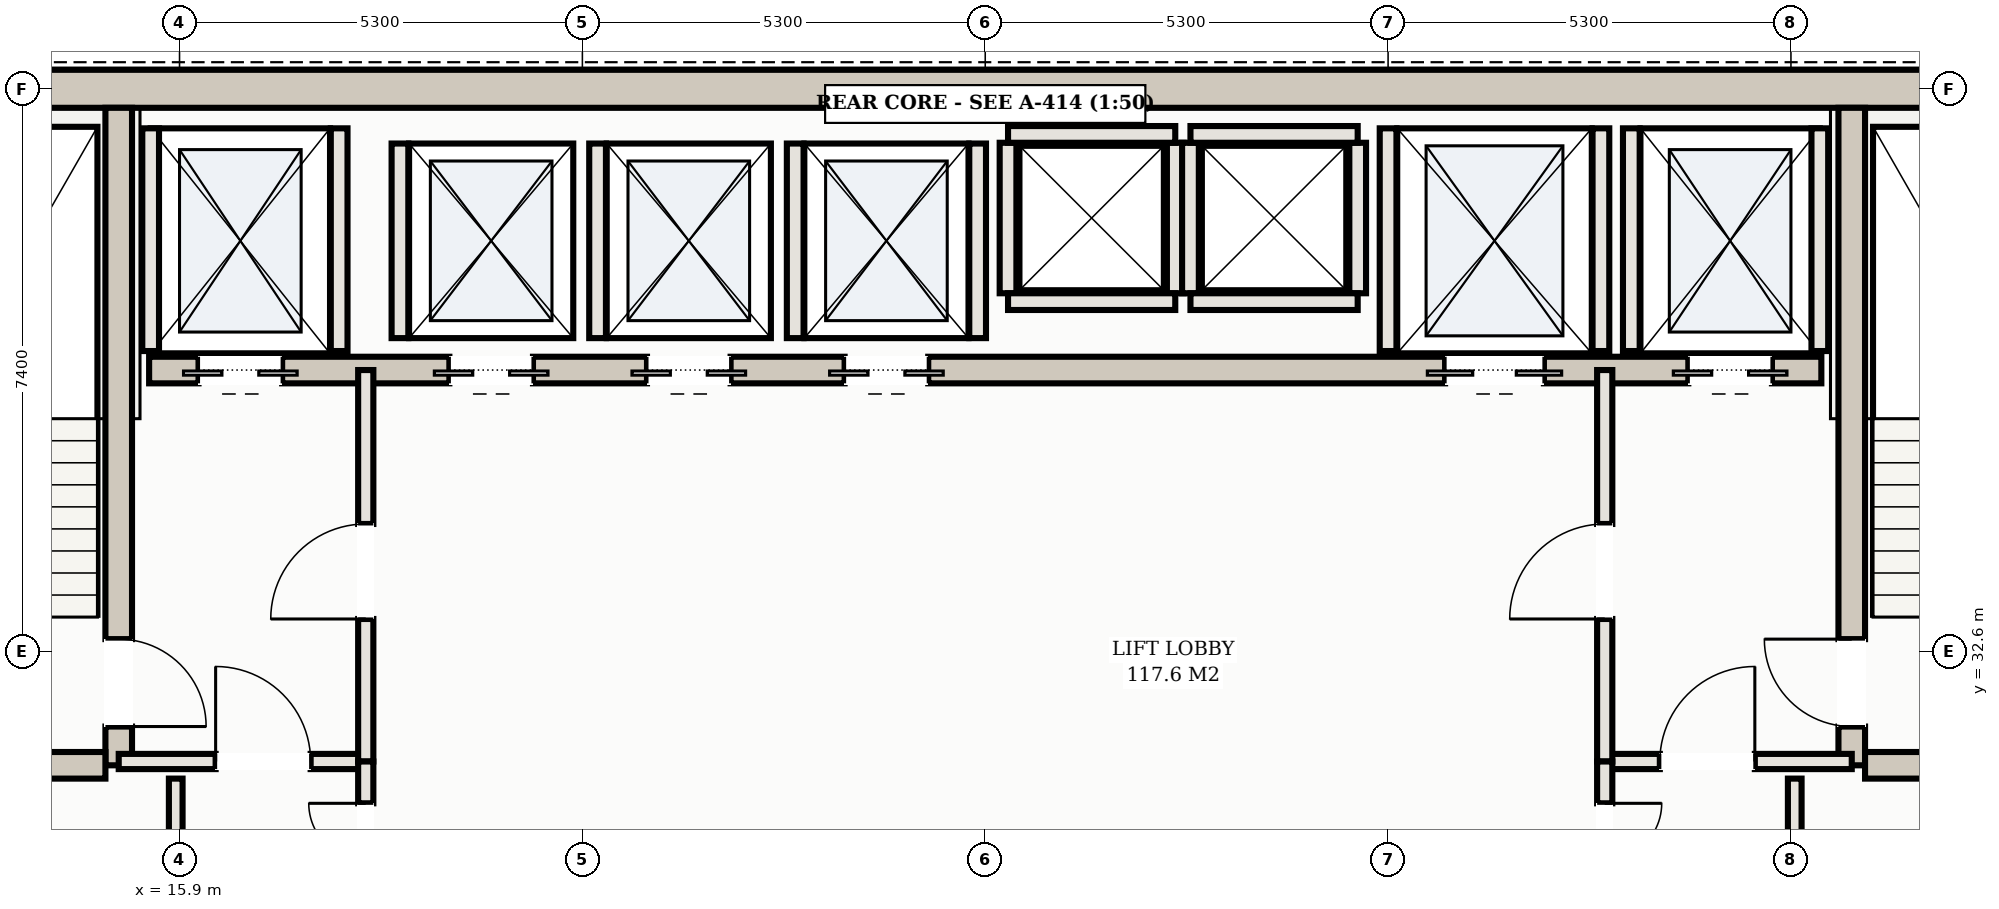
"""IFC4 building model, lengths in metres.
Left out: names, types, materials, properties, quantities, classifications, styles, units other than length and angle.
Written with IfcOpenShell. Run it as: python <this file> out.ifc"""

import sys

from ifc_helpers import new_model, si_unit, direction, frame, frame_2d, origin, place, context, subcontext, project, spatial, rectangle, extrude, element, fill, save


model = new_model("IFC4")
c1 = context("Model", 3, precision=1e-05, world=origin(), true_north=direction((0.0, 1.0)))
c2 = subcontext(c1, "Body", "Model", "MODEL_VIEW")
j1 = project(units=[si_unit("LENGTHUNIT", "METRE"), si_unit("PLANEANGLEUNIT", "RADIAN")], contexts=[c1])
p1 = place(None, origin())
s1 = spatial("IfcSite", under=j1, at=p1, CompositionType="ELEMENT")
p2 = place(p1, origin())
s2 = spatial("IfcBuilding", under=s1, at=p2, CompositionType="ELEMENT")
p3 = place(p2, frame((0.0, 0.0, 239.6)))
s3 = spatial("IfcBuildingStorey", under=s2, at=p3, CompositionType="ELEMENT", Elevation=239.6)
p4 = place(p3, frame((10.35, 40.0, 0.0), z_axis=(0.0, 0.0, 1.0), x_axis=(1.0, 0.0, 0.0)))
e1 = element("IfcWall", 1, at=p4, inside=s3, PredefinedType="SHEAR", context=c2, shape_type="SweptSolid", body=[
    extrude(rectangle(XDim=32.3, YDim=0.5, at=frame_2d((16.15, 0.0))), origin(), (0.0, 0.0, 1.0), 3.11),
])
p5 = place(p3, frame((15.1, 31.1, 0.0), z_axis=(0.0, 0.0, 1.0), x_axis=(0.0, 1.0, 0.0)))
e2 = element("IfcWall", 2, at=p5, inside=s3, PredefinedType="SHEAR", context=c2, shape_type="SweptSolid", body=[
    extrude(rectangle(XDim=8.65, YDim=0.35, at=frame_2d((4.325, 0.0))), origin(), (0.0, 0.0, 1.0), 3.11),
])
p6 = place(p5, frame((0.51, 0.0, 0.0)))
e3 = element("IfcOpeningElement", 3, at=p6, cuts=e2, PredefinedType="OPENING", context=c2, shape_type="SweptSolid", body=[
    extrude(rectangle(XDim=1.15, YDim=2.2, at=frame_2d((0.575, 1.1))), frame((0.0, 0.185, 0.0), z_axis=(0.0, -1.0, 0.0), x_axis=(1.0, 0.0, 0.0)), (0.0, 0.0, 1.0), 0.37),
])
p7 = place(p3, frame((10.85, 31.1, 0.0), z_axis=(0.0, 0.0, 1.0), x_axis=(1.0, 0.0, 0.0)))
e4 = element("IfcWall", 4, at=p7, inside=s3, PredefinedType="SHEAR", context=c2, shape_type="SweptSolid", body=[
    extrude(rectangle(XDim=4.075, YDim=0.35, at=frame_2d((2.038, 0.0))), origin(), (0.0, 0.0, 1.0), 3.11),
])
p8 = place(p3, frame((37.9, 31.1, 0.0), z_axis=(0.0, 0.0, 1.0), x_axis=(0.0, 1.0, 0.0)))
e5 = element("IfcWall", 5, at=p8, inside=s3, PredefinedType="SHEAR", context=c2, shape_type="SweptSolid", body=[
    extrude(rectangle(XDim=8.65, YDim=0.35, at=frame_2d((4.325, 0.0))), origin(), (0.0, 0.0, 1.0), 3.11),
])
p9 = place(p8, frame((0.51, 0.0, 0.0)))
e6 = element("IfcOpeningElement", 6, at=p9, cuts=e5, PredefinedType="OPENING", context=c2, shape_type="SweptSolid", body=[
    extrude(rectangle(XDim=1.15, YDim=2.2, at=frame_2d((0.575, 1.1))), frame((0.0, 0.185, 0.0), z_axis=(0.0, -1.0, 0.0), x_axis=(1.0, 0.0, 0.0)), (0.0, 0.0, 1.0), 0.37),
])
p10 = place(p3, frame((38.075, 31.1, 0.0), z_axis=(0.0, 0.0, 1.0), x_axis=(1.0, 0.0, 0.0)))
e7 = element("IfcWall", 7, at=p10, inside=s3, PredefinedType="SHEAR", context=c2, shape_type="SweptSolid", body=[
    extrude(rectangle(XDim=4.075, YDim=0.35, at=frame_2d((2.038, 0.0))), origin(), (0.0, 0.0, 1.0), 3.11),
])
p11 = place(p3, frame((15.5, 36.3, 0.0), z_axis=(0.0, 0.0, 1.0), x_axis=(1.0, 0.0, 0.0)))
e8 = element("IfcWall", 8, at=p11, inside=s3, PredefinedType="SHEAR", context=c2, shape_type="SweptSolid", body=[
    extrude(rectangle(XDim=22.0, YDim=0.35, at=frame_2d((11.0, 0.0))), origin(), (0.0, 0.0, 1.0), 3.11),
])
p12 = place(p11, frame((0.65, 0.0, 0.0)))
e9 = element("IfcOpeningElement", 9, at=p12, cuts=e8, PredefinedType="OPENING", context=c2, shape_type="SweptSolid", body=[
    extrude(rectangle(XDim=1.1, YDim=2.15, at=frame_2d((0.55, 1.075))), frame((0.0, 0.185, 0.0), z_axis=(0.0, -1.0, 0.0), x_axis=(1.0, 0.0, 0.0)), (0.0, 0.0, 1.0), 0.37),
])
p13 = place(p11, frame((20.25, 0.0, 0.0)))
e10 = element("IfcOpeningElement", 10, at=p13, cuts=e8, PredefinedType="OPENING", context=c2, shape_type="SweptSolid", body=[
    extrude(rectangle(XDim=1.1, YDim=2.15, at=frame_2d((0.55, 1.075))), frame((0.0, 0.185, 0.0), z_axis=(0.0, -1.0, 0.0), x_axis=(1.0, 0.0, 0.0)), (0.0, 0.0, 1.0), 0.37),
])
p14 = place(p11, frame((17.05, 0.0, 0.0)))
e11 = element("IfcOpeningElement", 11, at=p14, cuts=e8, PredefinedType="OPENING", context=c2, shape_type="SweptSolid", body=[
    extrude(rectangle(XDim=1.3, YDim=2.2, at=frame_2d((0.65, 1.1))), frame((0.0, 0.185, 0.0), z_axis=(0.0, -1.0, 0.0), x_axis=(1.0, 0.0, 0.0)), (0.0, 0.0, 1.0), 0.37),
])
p15 = place(p11, frame((3.95, 0.0, 0.0)))
e12 = element("IfcOpeningElement", 12, at=p15, cuts=e8, PredefinedType="OPENING", context=c2, shape_type="SweptSolid", body=[
    extrude(rectangle(XDim=1.1, YDim=2.15, at=frame_2d((0.55, 1.075))), frame((0.0, 0.185, 0.0), z_axis=(0.0, -1.0, 0.0), x_axis=(1.0, 0.0, 0.0)), (0.0, 0.0, 1.0), 0.37),
])
p16 = place(p11, frame((6.55, 0.0, 0.0)))
e13 = element("IfcOpeningElement", 13, at=p16, cuts=e8, PredefinedType="OPENING", context=c2, shape_type="SweptSolid", body=[
    extrude(rectangle(XDim=1.1, YDim=2.15, at=frame_2d((0.55, 1.075))), frame((0.0, 0.185, 0.0), z_axis=(0.0, -1.0, 0.0), x_axis=(1.0, 0.0, 0.0)), (0.0, 0.0, 1.0), 0.37),
])
p17 = place(p11, frame((9.15, 0.0, 0.0)))
e14 = element("IfcOpeningElement", 14, at=p17, cuts=e8, PredefinedType="OPENING", context=c2, shape_type="SweptSolid", body=[
    extrude(rectangle(XDim=1.1, YDim=2.15, at=frame_2d((0.55, 1.075))), frame((0.0, 0.185, 0.0), z_axis=(0.0, -1.0, 0.0), x_axis=(1.0, 0.0, 0.0)), (0.0, 0.0, 1.0), 0.37),
])
for number, where, z_axis, x_axis in (
    (15, (15.52, 36.55, 0.0), (0.0, 0.0, 1.0), (0.0, 1.0, 0.0)),
    (16, (18.0, 36.55, 0.0), (0.0, 0.0, 1.0), (0.0, 1.0, 0.0)),
    (17, (35.0, 36.55, 0.0), (0.0, 0.0, 1.0), (0.0, 1.0, 0.0)),
    (18, (37.48, 36.55, 0.0), (0.0, 0.0, 1.0), (0.0, 1.0, 0.0)),
    (19, (31.8, 36.55, 0.0), (0.0, 0.0, 1.0), (0.0, 1.0, 0.0)),
    (20, (34.6, 36.55, 0.0), (0.0, 0.0, 1.0), (0.0, 1.0, 0.0)),
):
    element("IfcWall", number, at=place(p3, frame(where, z_axis=z_axis, x_axis=x_axis)), inside=s3, PredefinedType="SOLIDWALL", context=c2, shape_type="SweptSolid", body=[
        extrude(rectangle(XDim=2.93, YDim=0.22, at=frame_2d((1.465, 0.0))), origin(), (0.0, 0.0, 1.0), 3.11),
    ])
for number, where, z_axis, x_axis in (
    (21, (18.8, 36.72, 0.0), (0.0, 0.0, 1.0), (0.0, 1.0, 0.0)),
    (22, (21.4, 36.72, 0.0), (0.0, 0.0, 1.0), (0.0, 1.0, 0.0)),
    (23, (24.0, 36.72, 0.0), (0.0, 0.0, 1.0), (0.0, 1.0, 0.0)),
    (24, (26.4, 36.72, 0.0), (0.0, 0.0, 1.0), (0.0, 1.0, 0.0)),
):
    element("IfcWall", number, at=place(p3, frame(where, z_axis=z_axis, x_axis=x_axis)), inside=s3, PredefinedType="SOLIDWALL", context=c2, shape_type="SweptSolid", body=[
        extrude(rectangle(XDim=2.56, YDim=0.22, at=frame_2d((1.28, 0.0))), origin(), (0.0, 0.0, 1.0), 3.11),
    ])
for number, where, z_axis, x_axis in (
    (25, (26.8, 37.31, 0.0), (0.0, 0.0, 1.0), (0.0, 1.0, 0.0)),
    (26, (29.0, 37.31, 0.0), (0.0, 0.0, 1.0), (0.0, 1.0, 0.0)),
):
    element("IfcWall", number, at=place(p3, frame(where, z_axis=z_axis, x_axis=x_axis)), inside=s3, PredefinedType="SOLIDWALL", context=c2, shape_type="SweptSolid", body=[
        extrude(rectangle(XDim=1.98, YDim=0.22, at=frame_2d((0.99, 0.0))), origin(), (0.0, 0.0, 1.0), 3.11),
    ])
for number, where, z_axis, x_axis in (
    (27, (26.8, 39.4, 0.0), (0.0, 0.0, 1.0), (1.0, 0.0, 0.0)),
    (28, (26.8, 37.2, 0.0), (0.0, 0.0, 1.0), (1.0, 0.0, 0.0)),
):
    element("IfcWall", number, at=place(p3, frame(where, z_axis=z_axis, x_axis=x_axis)), inside=s3, PredefinedType="SOLIDWALL", context=c2, shape_type="SweptSolid", body=[
        extrude(rectangle(XDim=2.2, YDim=0.22, at=frame_2d((1.1, 0.0))), origin(), (0.0, 0.0, 1.0), 3.11),
    ])
for number, where, z_axis, x_axis in (
    (29, (29.2, 37.31, 0.0), (0.0, 0.0, 1.0), (0.0, 1.0, 0.0)),
    (30, (31.4, 37.31, 0.0), (0.0, 0.0, 1.0), (0.0, 1.0, 0.0)),
):
    element("IfcWall", number, at=place(p3, frame(where, z_axis=z_axis, x_axis=x_axis)), inside=s3, PredefinedType="SOLIDWALL", context=c2, shape_type="SweptSolid", body=[
        extrude(rectangle(XDim=1.98, YDim=0.22, at=frame_2d((0.99, 0.0))), origin(), (0.0, 0.0, 1.0), 3.11),
    ])
for number, where, z_axis, x_axis in (
    (31, (29.2, 39.4, 0.0), (0.0, 0.0, 1.0), (1.0, 0.0, 0.0)),
    (32, (29.2, 37.2, 0.0), (0.0, 0.0, 1.0), (1.0, 0.0, 0.0)),
):
    element("IfcWall", number, at=place(p3, frame(where, z_axis=z_axis, x_axis=x_axis)), inside=s3, PredefinedType="SOLIDWALL", context=c2, shape_type="SweptSolid", body=[
        extrude(rectangle(XDim=2.2, YDim=0.22, at=frame_2d((1.1, 0.0))), origin(), (0.0, 0.0, 1.0), 3.11),
    ])
p18 = place(p3, frame((15.1, 31.15, 0.0), z_axis=(0.0, 0.0, 1.0), x_axis=(1.0, 0.0, 0.0)))
e33 = element("IfcWall", 33, at=p18, inside=s3, PredefinedType="PARTITIONING", context=c2, shape_type="SweptSolid", body=[
    extrude(rectangle(XDim=3.25, YDim=0.2, at=frame_2d((1.625, 0.0))), origin(), (0.0, 0.0, 1.0), 2.45),
])
p19 = place(p18, frame((1.275, 0.0, 0.0)))
e34 = element("IfcOpeningElement", 34, at=p19, cuts=e33, PredefinedType="OPENING", context=c2, shape_type="SweptSolid", body=[
    extrude(rectangle(XDim=1.25, YDim=2.2, at=frame_2d((0.625, 1.1))), frame((0.0, 0.11, 0.0), z_axis=(0.0, -1.0, 0.0), x_axis=(1.0, 0.0, 0.0)), (0.0, 0.0, 1.0), 0.22),
])
p20 = place(p3, frame((18.35, 31.15, 0.0), z_axis=(0.0, 0.0, 1.0), x_axis=(0.0, 1.0, 0.0)))
e35 = element("IfcWall", 35, at=p20, inside=s3, PredefinedType="PARTITIONING", context=c2, shape_type="SweptSolid", body=[
    extrude(rectangle(XDim=5.15, YDim=0.2, at=frame_2d((2.575, 0.0))), origin(), (0.0, 0.0, 1.0), 2.45),
])
p21 = place(p20, frame((1.875, 0.0, 0.0)))
e36 = element("IfcOpeningElement", 36, at=p21, cuts=e35, PredefinedType="OPENING", context=c2, shape_type="SweptSolid", body=[
    extrude(rectangle(XDim=1.25, YDim=2.2, at=frame_2d((0.625, 1.1))), frame((0.0, 0.11, 0.0), z_axis=(0.0, -1.0, 0.0), x_axis=(1.0, 0.0, 0.0)), (0.0, 0.0, 1.0), 0.22),
])
p22 = place(p3, frame((34.65, 31.15, 0.0), z_axis=(0.0, 0.0, 1.0), x_axis=(1.0, 0.0, 0.0)))
e37 = element("IfcWall", 37, at=p22, inside=s3, PredefinedType="PARTITIONING", context=c2, shape_type="SweptSolid", body=[
    extrude(rectangle(XDim=3.25, YDim=0.2, at=frame_2d((1.625, 0.0))), origin(), (0.0, 0.0, 1.0), 2.45),
])
p23 = place(p22, frame((0.725, 0.0, 0.0)))
e38 = element("IfcOpeningElement", 38, at=p23, cuts=e37, PredefinedType="OPENING", context=c2, shape_type="SweptSolid", body=[
    extrude(rectangle(XDim=1.25, YDim=2.2, at=frame_2d((0.625, 1.1))), frame((0.0, 0.11, 0.0), z_axis=(0.0, -1.0, 0.0), x_axis=(1.0, 0.0, 0.0)), (0.0, 0.0, 1.0), 0.22),
])
p24 = place(p3, frame((34.65, 31.15, 0.0), z_axis=(0.0, 0.0, 1.0), x_axis=(0.0, 1.0, 0.0)))
e39 = element("IfcWall", 39, at=p24, inside=s3, PredefinedType="PARTITIONING", context=c2, shape_type="SweptSolid", body=[
    extrude(rectangle(XDim=5.15, YDim=0.2, at=frame_2d((2.575, 0.0))), origin(), (0.0, 0.0, 1.0), 2.45),
])
p25 = place(p24, frame((1.875, 0.0, 0.0)))
e40 = element("IfcOpeningElement", 40, at=p25, cuts=e39, PredefinedType="OPENING", context=c2, shape_type="SweptSolid", body=[
    extrude(rectangle(XDim=1.25, YDim=2.2, at=frame_2d((0.625, 1.1))), frame((0.0, 0.11, 0.0), z_axis=(0.0, -1.0, 0.0), x_axis=(1.0, 0.0, 0.0)), (0.0, 0.0, 1.0), 0.22),
])
p26 = place(p3, frame((15.85, 25.45, 0.0), z_axis=(0.0, 0.0, 1.0), x_axis=(0.0, 1.0, 0.0)))
e41 = element("IfcWall", 41, at=p26, inside=s3, PredefinedType="PARTITIONING", context=c2, shape_type="SweptSolid", body=[
    extrude(rectangle(XDim=5.475, YDim=0.18, at=frame_2d((2.738, 0.0))), origin(), (0.0, 0.0, 1.0), 2.45),
])
p27 = place(p26, frame((2.277, 0.0, 0.0)))
e42 = element("IfcOpeningElement", 42, at=p27, cuts=e41, PredefinedType="OPENING", context=c2, shape_type="SweptSolid", body=[
    extrude(rectangle(XDim=0.92, YDim=2.15, at=frame_2d((0.46, 1.075))), frame((0.0, 0.1, 0.0), z_axis=(0.0, -1.0, 0.0), x_axis=(1.0, 0.0, 0.0)), (0.0, 0.0, 1.0), 0.2),
])
p28 = place(p3, frame((37.15, 25.45, 0.0), z_axis=(0.0, 0.0, 1.0), x_axis=(0.0, 1.0, 0.0)))
e43 = element("IfcWall", 43, at=p28, inside=s3, PredefinedType="PARTITIONING", context=c2, shape_type="SweptSolid", body=[
    extrude(rectangle(XDim=5.475, YDim=0.18, at=frame_2d((2.738, 0.0))), origin(), (0.0, 0.0, 1.0), 2.45),
])
p29 = place(p28, frame((2.277, 0.0, 0.0)))
e44 = element("IfcOpeningElement", 44, at=p29, cuts=e43, PredefinedType="OPENING", context=c2, shape_type="SweptSolid", body=[
    extrude(rectangle(XDim=0.92, YDim=2.15, at=frame_2d((0.46, 1.075))), frame((0.0, 0.1, 0.0), z_axis=(0.0, -1.0, 0.0), x_axis=(1.0, 0.0, 0.0)), (0.0, 0.0, 1.0), 0.2),
])
p30 = place(p3, frame((18.35, 28.55, 0.0), z_axis=(0.0, 0.0, 1.0), x_axis=(0.0, 1.0, 0.0)))
e45 = element("IfcWall", 45, at=p30, inside=s3, PredefinedType="PARTITIONING", context=c2, shape_type="SweptSolid", body=[
    extrude(rectangle(XDim=2.6, YDim=0.2, at=frame_2d((1.3, 0.0))), origin(), (0.0, 0.0, 1.0), 2.45),
])
p31 = place(p30, frame((0.55, 0.0, 0.0)))
e46 = element("IfcOpeningElement", 46, at=p31, cuts=e45, PredefinedType="OPENING", context=c2, shape_type="SweptSolid", body=[
    extrude(rectangle(XDim=1.5, YDim=2.25, at=frame_2d((0.75, 1.125))), frame((0.0, 0.11, 0.0), z_axis=(0.0, -1.0, 0.0), x_axis=(1.0, 0.0, 0.0)), (0.0, 0.0, 1.0), 0.22),
])
p32 = place(p3, frame((34.65, 28.55, 0.0), z_axis=(0.0, 0.0, 1.0), x_axis=(0.0, 1.0, 0.0)))
e47 = element("IfcWall", 47, at=p32, inside=s3, PredefinedType="PARTITIONING", context=c2, shape_type="SweptSolid", body=[
    extrude(rectangle(XDim=2.6, YDim=0.2, at=frame_2d((1.3, 0.0))), origin(), (0.0, 0.0, 1.0), 2.45),
])
p33 = place(p32, frame((0.55, 0.0, 0.0)))
e48 = element("IfcOpeningElement", 48, at=p33, cuts=e47, PredefinedType="OPENING", context=c2, shape_type="SweptSolid", body=[
    extrude(rectangle(XDim=1.5, YDim=2.25, at=frame_2d((0.75, 1.125))), frame((0.0, 0.11, 0.0), z_axis=(0.0, -1.0, 0.0), x_axis=(1.0, 0.0, 0.0)), (0.0, 0.0, 1.0), 0.22),
])
p34 = place(p12, frame((1.1, 0.0, 0.0), z_axis=(0.0, 0.0, 1.0), x_axis=(-1.0, 0.0, 0.0)))
e49 = element("IfcDoor", 49, at=p34, inside=s3, OperationType="DOUBLE_DOOR_SLIDING", PredefinedType="DOOR", context=c2, shape_type="SweptSolid", body=[
    extrude(rectangle(XDim=1.1, YDim=2.15, at=frame_2d((0.55, 1.075))), frame((0.0, 0.025, 0.0), z_axis=(0.0, -1.0, 0.0), x_axis=(1.0, 0.0, 0.0)), (0.0, 0.0, 1.0), 0.05),
])
fill(e9, e49)
p35 = place(p13, frame((1.1, 0.0, 0.0), z_axis=(0.0, 0.0, 1.0), x_axis=(-1.0, 0.0, 0.0)))
e50 = element("IfcDoor", 50, at=p35, inside=s3, OperationType="DOUBLE_DOOR_SLIDING", PredefinedType="DOOR", context=c2, shape_type="SweptSolid", body=[
    extrude(rectangle(XDim=1.1, YDim=2.15, at=frame_2d((0.55, 1.075))), frame((0.0, 0.025, 0.0), z_axis=(0.0, -1.0, 0.0), x_axis=(1.0, 0.0, 0.0)), (0.0, 0.0, 1.0), 0.05),
])
fill(e10, e50)
p36 = place(p14, frame((1.3, 0.0, 0.0), z_axis=(0.0, 0.0, 1.0), x_axis=(-1.0, 0.0, 0.0)))
e51 = element("IfcDoor", 51, at=p36, inside=s3, OperationType="DOUBLE_DOOR_SLIDING", PredefinedType="DOOR", context=c2, shape_type="SweptSolid", body=[
    extrude(rectangle(XDim=1.3, YDim=2.2, at=frame_2d((0.65, 1.1))), frame((0.0, 0.025, 0.0), z_axis=(0.0, -1.0, 0.0), x_axis=(1.0, 0.0, 0.0)), (0.0, 0.0, 1.0), 0.05),
])
fill(e11, e51)
p37 = place(p15, frame((1.1, 0.0, 0.0), z_axis=(0.0, 0.0, 1.0), x_axis=(-1.0, 0.0, 0.0)))
e52 = element("IfcDoor", 52, at=p37, inside=s3, OperationType="DOUBLE_DOOR_SLIDING", PredefinedType="DOOR", context=c2, shape_type="SweptSolid", body=[
    extrude(rectangle(XDim=1.1, YDim=2.15, at=frame_2d((0.55, 1.075))), frame((0.0, 0.025, 0.0), z_axis=(0.0, -1.0, 0.0), x_axis=(1.0, 0.0, 0.0)), (0.0, 0.0, 1.0), 0.05),
])
fill(e12, e52)
p38 = place(p16, frame((1.1, 0.0, 0.0), z_axis=(0.0, 0.0, 1.0), x_axis=(-1.0, 0.0, 0.0)))
e53 = element("IfcDoor", 53, at=p38, inside=s3, OperationType="DOUBLE_DOOR_SLIDING", PredefinedType="DOOR", context=c2, shape_type="SweptSolid", body=[
    extrude(rectangle(XDim=1.1, YDim=2.15, at=frame_2d((0.55, 1.075))), frame((0.0, 0.025, 0.0), z_axis=(0.0, -1.0, 0.0), x_axis=(1.0, 0.0, 0.0)), (0.0, 0.0, 1.0), 0.05),
])
fill(e13, e53)
p39 = place(p17, frame((1.1, 0.0, 0.0), z_axis=(0.0, 0.0, 1.0), x_axis=(-1.0, 0.0, 0.0)))
e54 = element("IfcDoor", 54, at=p39, inside=s3, OperationType="DOUBLE_DOOR_SLIDING", PredefinedType="DOOR", context=c2, shape_type="SweptSolid", body=[
    extrude(rectangle(XDim=1.1, YDim=2.15, at=frame_2d((0.55, 1.075))), frame((0.0, 0.025, 0.0), z_axis=(0.0, -1.0, 0.0), x_axis=(1.0, 0.0, 0.0)), (0.0, 0.0, 1.0), 0.05),
])
fill(e14, e54)
p40 = place(p19, origin())
e55 = element("IfcDoor", 55, at=p40, inside=s3, OperationType="SINGLE_SWING_LEFT", PredefinedType="DOOR", context=c2, shape_type="SweptSolid", body=[
    extrude(rectangle(XDim=1.25, YDim=2.2, at=frame_2d((0.625, 1.1))), frame((0.0, 0.025, 0.0), z_axis=(0.0, -1.0, 0.0), x_axis=(1.0, 0.0, 0.0)), (0.0, 0.0, 1.0), 0.05),
])
fill(e34, e55)
p41 = place(p21, origin())
e56 = element("IfcDoor", 56, at=p41, inside=s3, OperationType="SINGLE_SWING_LEFT", PredefinedType="DOOR", context=c2, shape_type="SweptSolid", body=[
    extrude(rectangle(XDim=1.25, YDim=2.2, at=frame_2d((0.625, 1.1))), frame((0.0, 0.025, 0.0), z_axis=(0.0, -1.0, 0.0), x_axis=(1.0, 0.0, 0.0)), (0.0, 0.0, 1.0), 0.05),
])
fill(e36, e56)
p42 = place(p23, origin())
e57 = element("IfcDoor", 57, at=p42, inside=s3, OperationType="SINGLE_SWING_RIGHT", PredefinedType="DOOR", context=c2, shape_type="SweptSolid", body=[
    extrude(rectangle(XDim=1.25, YDim=2.2, at=frame_2d((0.625, 1.1))), frame((0.0, 0.025, 0.0), z_axis=(0.0, -1.0, 0.0), x_axis=(1.0, 0.0, 0.0)), (0.0, 0.0, 1.0), 0.05),
])
fill(e38, e57)
p43 = place(p25, origin())
e58 = element("IfcDoor", 58, at=p43, inside=s3, OperationType="SINGLE_SWING_LEFT", PredefinedType="DOOR", context=c2, shape_type="SweptSolid", body=[
    extrude(rectangle(XDim=1.25, YDim=2.2, at=frame_2d((0.625, 1.1))), frame((0.0, 0.025, 0.0), z_axis=(0.0, -1.0, 0.0), x_axis=(1.0, 0.0, 0.0)), (0.0, 0.0, 1.0), 0.05),
])
fill(e40, e58)
p44 = place(p6, frame((1.15, 0.0, 0.0), z_axis=(0.0, 0.0, 1.0), x_axis=(-1.0, 0.0, 0.0)))
e59 = element("IfcDoor", 59, at=p44, inside=s3, OperationType="SINGLE_SWING_RIGHT", PredefinedType="DOOR", context=c2, shape_type="SweptSolid", body=[
    extrude(rectangle(XDim=1.15, YDim=2.2, at=frame_2d((0.575, 1.1))), frame((0.0, 0.025, 0.0), z_axis=(0.0, -1.0, 0.0), x_axis=(1.0, 0.0, 0.0)), (0.0, 0.0, 1.0), 0.05),
])
fill(e3, e59)
p45 = place(p9, origin())
e60 = element("IfcDoor", 60, at=p45, inside=s3, OperationType="SINGLE_SWING_RIGHT", PredefinedType="DOOR", context=c2, shape_type="SweptSolid", body=[
    extrude(rectangle(XDim=1.15, YDim=2.2, at=frame_2d((0.575, 1.1))), frame((0.0, 0.025, 0.0), z_axis=(0.0, -1.0, 0.0), x_axis=(1.0, 0.0, 0.0)), (0.0, 0.0, 1.0), 0.05),
])
fill(e6, e60)
p46 = place(p31, origin())
e61 = element("IfcDoor", 61, at=p46, inside=s3, OperationType="DOUBLE_DOOR_SINGLE_SWING", PredefinedType="DOOR", context=c2, shape_type="SweptSolid", body=[
    extrude(rectangle(XDim=1.5, YDim=2.25, at=frame_2d((0.75, 1.125))), frame((0.0, 0.025, 0.0), z_axis=(0.0, -1.0, 0.0), x_axis=(1.0, 0.0, 0.0)), (0.0, 0.0, 1.0), 0.05),
])
fill(e46, e61)
p47 = place(p33, frame((1.5, 0.0, 0.0), z_axis=(0.0, 0.0, 1.0), x_axis=(-1.0, 0.0, 0.0)))
e62 = element("IfcDoor", 62, at=p47, inside=s3, OperationType="DOUBLE_DOOR_SINGLE_SWING", PredefinedType="DOOR", context=c2, shape_type="SweptSolid", body=[
    extrude(rectangle(XDim=1.5, YDim=2.25, at=frame_2d((0.75, 1.125))), frame((0.0, 0.025, 0.0), z_axis=(0.0, -1.0, 0.0), x_axis=(1.0, 0.0, 0.0)), (0.0, 0.0, 1.0), 0.05),
])
fill(e48, e62)
save(model, sys.argv[1])
